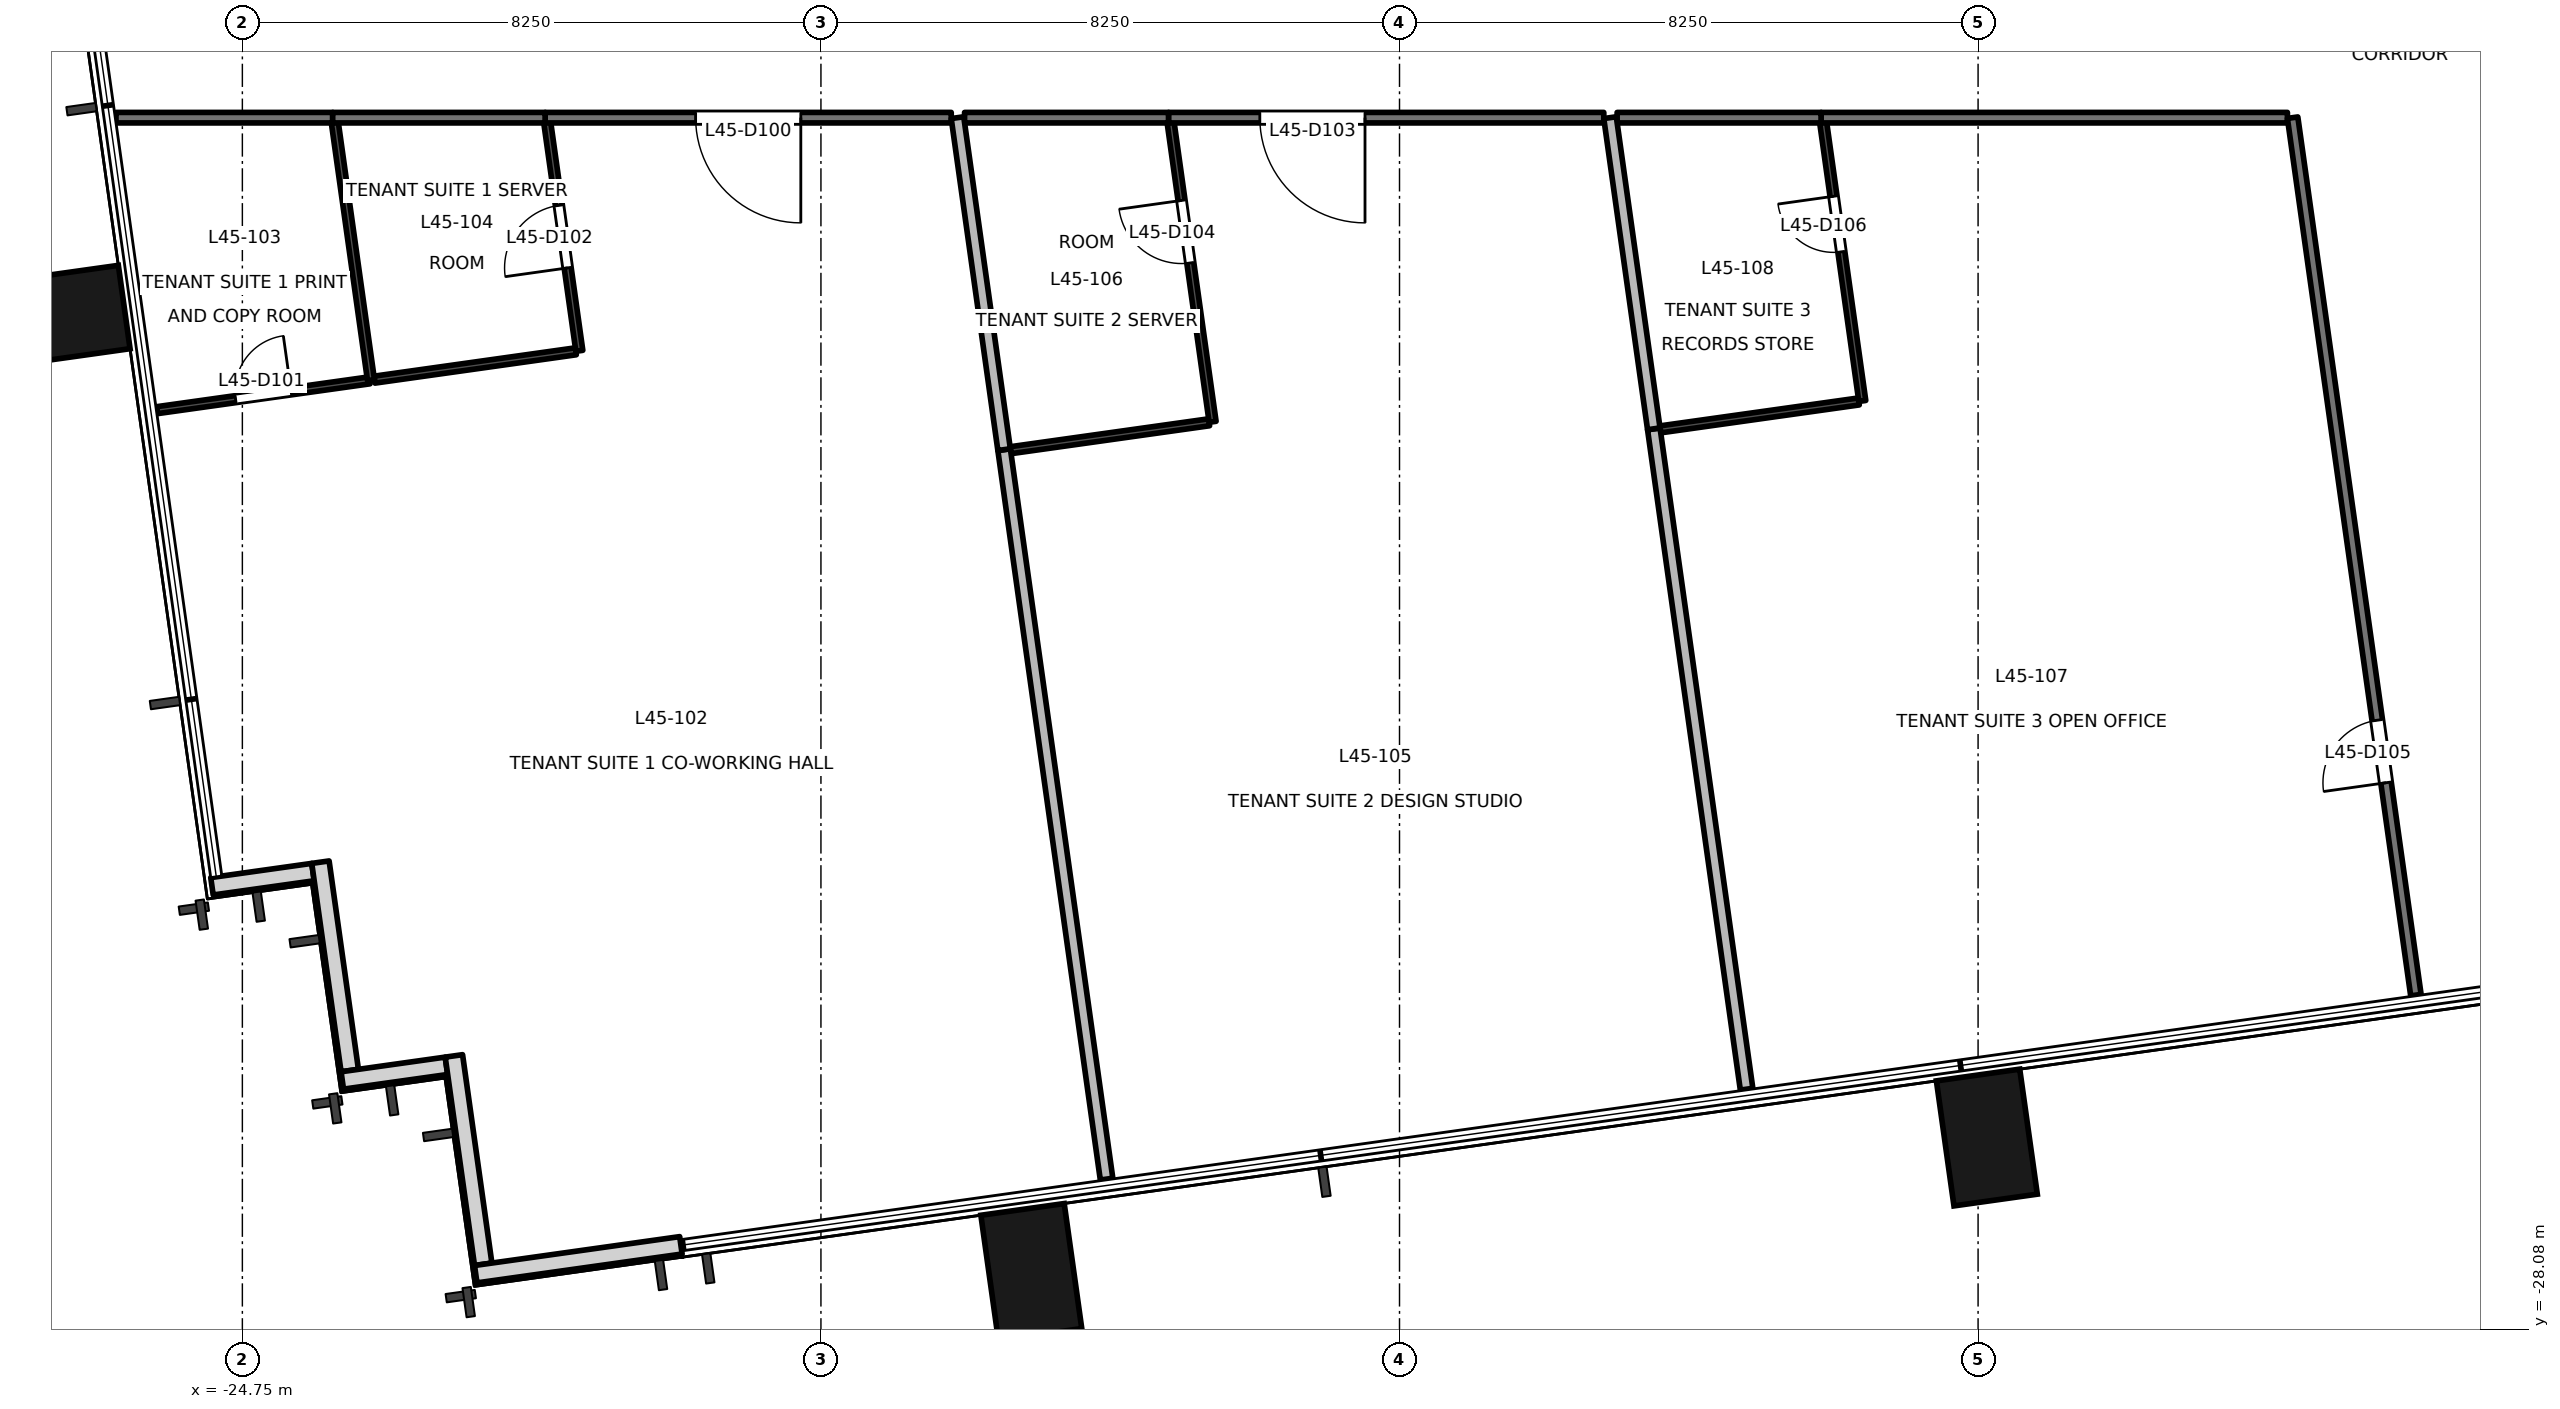
"""IFC4 building model, lengths in metres.
Left out: names, types, materials, properties, quantities, classifications, styles, units other than length and angle.
Written with IfcOpenShell. Run it as: python <this file> out.ifc"""

import sys

from ifc_helpers import new_model, si_unit, direction, frame, frame_2d, origin, origin_2d, place, context, subcontext, project, spatial, rectangle, extrude, element, fill, save


model = new_model("IFC4")
c1 = context("Model", 3, precision=1e-05, world=origin(), true_north=direction((0.0, 1.0)))
c2 = subcontext(c1, "Body", "Model", "MODEL_VIEW")
j1 = project(units=[si_unit("LENGTHUNIT", "METRE"), si_unit("PLANEANGLEUNIT", "RADIAN")], contexts=[c1])
p1 = place(None, origin())
s1 = spatial("IfcSite", under=j1, at=p1, CompositionType="ELEMENT")
p2 = place(p1, origin())
s2 = spatial("IfcBuilding", under=s1, at=p2, CompositionType="ELEMENT")
p3 = place(p2, frame((0.0, 0.0, 195.8)))
s3 = spatial("IfcBuildingStorey", under=s2, at=p3, CompositionType="ELEMENT", Elevation=195.8)
for number, where, z_axis, x_axis in (
    (1, (-13.5, -27.256, -0.2), (0.0, 0.0, 1.0), (0.99, 0.139, 0.0)),
    (2, (0.125, -25.34, -0.2), (0.0, 0.0, 1.0), (0.99, 0.139, 0.0)),
    (3, (-27.326, -13.625, -0.2), (0.0, 0.0, 1.0), (-0.139, 0.99, 0.0)),
):
    element("IfcColumn", number, at=place(p3, frame(where, z_axis=z_axis, x_axis=x_axis)), inside=s3, PredefinedType="COLUMN", context=c2, shape_type="SweptSolid", body=[
        extrude(rectangle(XDim=1.2, YDim=1.8, at=origin_2d()), origin(), (0.0, 0.0, 1.0), 3.9),
    ])
p4 = place(p3, frame((-25.184, -21.758, 0.0), z_axis=(0.0, 0.0, 1.0), x_axis=(0.9902493448, 0.13930626376, 0.0)))
e4 = element("IfcWall", 4, at=p4, inside=s3, PredefinedType="SOLIDWALL", context=c2, shape_type="SweptSolid", body=[
    extrude(rectangle(XDim=1.455, YDim=0.25, at=frame_2d((0.727, 0.0))), origin(), (0.0, 0.0, 1.0), 3.7),
])
p5 = place(p3, frame((-23.637, -21.414, 0.0), z_axis=(0.0, 0.0, 1.0), x_axis=(0.139313431826, -0.990248336385, 0.0)))
e5 = element("IfcWall", 5, at=p5, inside=s3, PredefinedType="SOLIDWALL", context=c2, shape_type="SweptSolid", body=[
    extrude(rectangle(XDim=3.0, YDim=0.25, at=frame_2d((1.5, 0.0))), origin(), (0.0, 0.0, 1.0), 3.7),
])
p6 = place(p3, frame((-23.325, -24.526, 0.0), z_axis=(0.0, 0.0, 1.0), x_axis=(0.990243596651, 0.13934711799, 0.0)))
e6 = element("IfcWall", 6, at=p6, inside=s3, PredefinedType="SOLIDWALL", context=c2, shape_type="SweptSolid", body=[
    extrude(rectangle(XDim=1.5, YDim=0.25, at=frame_2d((0.75, 0.0))), origin(), (0.0, 0.0, 1.0), 3.7),
])
p7 = place(p3, frame((-21.734, -24.176, 0.0), z_axis=(0.0, 0.0, 1.0), x_axis=(0.139313431826, -0.990248336385, 0.0)))
e7 = element("IfcWall", 7, at=p7, inside=s3, PredefinedType="SOLIDWALL", context=c2, shape_type="SweptSolid", body=[
    extrude(rectangle(XDim=3.0, YDim=0.25, at=frame_2d((1.5, 0.0))), origin(), (0.0, 0.0, 1.0), 3.7),
])
p8 = place(p3, frame((-21.422, -27.288, 0.0), z_axis=(0.0, 0.0, 1.0), x_axis=(0.990246427036, 0.139327002919, 0.0)))
e8 = element("IfcWall", 8, at=p8, inside=s3, PredefinedType="SOLIDWALL", context=c2, shape_type="SweptSolid", body=[
    extrude(rectangle(XDim=2.954, YDim=0.25, at=frame_2d((1.477, 0.0))), origin(), (0.0, 0.0, 1.0), 3.7),
])
p9 = place(p3, frame((-14.642, -10.8, 0.0), z_axis=(0.0, 0.0, 1.0), x_axis=(-1.0, 0.0, 0.0)))
e9 = element("IfcWall", 9, at=p9, inside=s3, PredefinedType="PARTITIONING", context=c2, shape_type="SweptSolid", body=[
    extrude(rectangle(XDim=5.791, YDim=0.15, at=frame_2d((2.896, 0.0))), origin(), (0.0, 0.0, 1.0), 3.7),
])
p10 = place(p9, frame((2.145, 0.0, 0.0)))
e10 = element("IfcOpeningElement", 10, at=p10, cuts=e9, PredefinedType="OPENING", context=c2, shape_type="SweptSolid", body=[
    extrude(rectangle(XDim=1.5, YDim=2.1, at=frame_2d((0.75, 1.05))), frame((0.0, 0.085, 0.0), z_axis=(0.0, -1.0, 0.0), x_axis=(1.0, 0.0, 0.0)), (0.0, 0.0, 1.0), 0.171),
])
p11 = place(p3, frame((-23.462, -10.8, 0.0), z_axis=(0.0, 0.0, 1.0), x_axis=(-1.0, 0.0, 0.0)))
e11 = element("IfcWall", 11, at=p11, inside=s3, PredefinedType="PARTITIONING", context=c2, shape_type="SweptSolid", body=[
    extrude(rectangle(XDim=3.09, YDim=0.15, at=frame_2d((1.545, 0.0))), origin(), (0.0, 0.0, 1.0), 3.7),
])
p12 = place(p3, frame((-20.433, -10.8, 0.0), z_axis=(0.0, 0.0, 1.0), x_axis=(-1.0, 0.0, 0.0)))
e12 = element("IfcWall", 12, at=p12, inside=s3, PredefinedType="PARTITIONING", context=c2, shape_type="SweptSolid", body=[
    extrude(rectangle(XDim=3.029, YDim=0.15, at=frame_2d((1.514, 0.0))), origin(), (0.0, 0.0, 1.0), 3.7),
])
p13 = place(p3, frame((-5.337, -10.8, 0.0), z_axis=(0.0, 0.0, 1.0), x_axis=(-1.0, 0.0, 0.0)))
e13 = element("IfcWall", 13, at=p13, inside=s3, PredefinedType="PARTITIONING", context=c2, shape_type="SweptSolid", body=[
    extrude(rectangle(XDim=6.207, YDim=0.15, at=frame_2d((3.104, 0.0))), origin(), (0.0, 0.0, 1.0), 2.8),
])
p14 = place(p13, frame((3.405, 0.0, 0.0)))
e14 = element("IfcOpeningElement", 14, at=p14, cuts=e13, PredefinedType="OPENING", context=c2, shape_type="SweptSolid", body=[
    extrude(rectangle(XDim=1.5, YDim=2.1, at=frame_2d((0.75, 1.05))), frame((0.0, 0.085, 0.0), z_axis=(0.0, -1.0, 0.0), x_axis=(1.0, 0.0, 0.0)), (0.0, 0.0, 1.0), 0.171),
])
p15 = place(p3, frame((-11.544, -10.8, 0.0), z_axis=(0.0, 0.0, 1.0), x_axis=(-1.0, 0.0, 0.0)))
e15 = element("IfcWall", 15, at=p15, inside=s3, PredefinedType="PARTITIONING", context=c2, shape_type="SweptSolid", body=[
    extrude(rectangle(XDim=2.908, YDim=0.15, at=frame_2d((1.454, 0.0))), origin(), (0.0, 0.0, 1.0), 2.8),
])
p16 = place(p3, frame((4.411, -10.8, 0.0), z_axis=(0.0, 0.0, 1.0), x_axis=(-1.0, 0.0, 0.0)))
e16 = element("IfcWall", 16, at=p16, inside=s3, PredefinedType="PARTITIONING", context=c2, shape_type="SweptSolid", body=[
    extrude(rectangle(XDim=6.65, YDim=0.15, at=frame_2d((3.325, 0.0))), origin(), (0.0, 0.0, 1.0), 2.9),
])
p17 = place(p3, frame((6.243, -23.31, 0.0), z_axis=(0.0, 0.0, 1.0), x_axis=(-0.139145566137, 0.990271938118, 0.0)))
e17 = element("IfcWall", 17, at=p17, inside=s3, PredefinedType="PARTITIONING", context=c2, shape_type="SweptSolid", body=[
    extrude(rectangle(XDim=12.633, YDim=0.15, at=frame_2d((6.316, 0.0))), origin(), (0.0, 0.0, 1.0), 2.9),
])
p18 = place(p17, frame((3.058, 0.0, 0.0)))
e18 = element("IfcOpeningElement", 18, at=p18, cuts=e17, PredefinedType="OPENING", context=c2, shape_type="SweptSolid", body=[
    extrude(rectangle(XDim=0.9, YDim=2.1, at=frame_2d((0.45, 1.05))), frame((0.0, 0.085, 0.0), z_axis=(0.0, -1.0, 0.0), x_axis=(1.0, 0.0, 0.0)), (0.0, 0.0, 1.0), 0.171),
])
p19 = place(p3, frame((-2.239, -10.8, 0.0), z_axis=(0.0, 0.0, 1.0), x_axis=(-1.0, 0.0, 0.0)))
e19 = element("IfcWall", 19, at=p19, inside=s3, PredefinedType="PARTITIONING", context=c2, shape_type="SweptSolid", body=[
    extrude(rectangle(XDim=2.908, YDim=0.15, at=frame_2d((1.454, 0.0))), origin(), (0.0, 0.0, 1.0), 2.9),
])
p20 = place(p3, frame((-25.966, -14.97, 0.0), z_axis=(0.0, 0.0, 1.0), x_axis=(0.990303801212, 0.138918613964, 0.0)))
e20 = element("IfcWall", 20, at=p20, inside=s3, PredefinedType="PARTITIONING", context=c2, shape_type="SweptSolid", body=[
    extrude(rectangle(XDim=3.06, YDim=0.1, at=frame_2d((1.53, 0.0))), origin(), (0.0, 0.0, 1.0), 3.7),
])
p21 = place(p20, frame((1.13, 0.0, 0.0)))
e21 = element("IfcOpeningElement", 21, at=p21, cuts=e20, PredefinedType="OPENING", context=c2, shape_type="SweptSolid", body=[
    extrude(rectangle(XDim=0.8, YDim=2.1, at=frame_2d((0.4, 1.05))), frame((0.0, 0.061, 0.0), z_axis=(0.0, -1.0, 0.0), x_axis=(1.0, 0.0, 0.0)), (0.0, 0.0, 1.0), 0.121),
])
p22 = place(p3, frame((-22.866, -14.535, 0.0), z_axis=(0.0, 0.0, 1.0), x_axis=(0.9902520421, 0.139287088837, 0.0)))
e22 = element("IfcWall", 22, at=p22, inside=s3, PredefinedType="PARTITIONING", context=c2, shape_type="SweptSolid", body=[
    extrude(rectangle(XDim=2.899, YDim=0.1, at=frame_2d((1.45, 0.0))), origin(), (0.0, 0.0, 1.0), 3.7),
])
p23 = place(p3, frame((-19.945, -14.124, 0.0), z_axis=(0.0, 0.0, 1.0), x_axis=(-0.139290097993, 0.990251618833, 0.0)))
e23 = element("IfcWall", 23, at=p23, inside=s3, PredefinedType="PARTITIONING", context=c2, shape_type="SweptSolid", body=[
    extrude(rectangle(XDim=3.288, YDim=0.1, at=frame_2d((1.644, 0.0))), origin(), (0.0, 0.0, 1.0), 3.7),
])
p24 = place(p23, frame((1.194, 0.0, 0.0)))
e24 = element("IfcOpeningElement", 24, at=p24, cuts=e23, PredefinedType="OPENING", context=c2, shape_type="SweptSolid", body=[
    extrude(rectangle(XDim=0.9, YDim=2.1, at=frame_2d((0.45, 1.05))), frame((0.0, 0.061, 0.0), z_axis=(0.0, -1.0, 0.0), x_axis=(1.0, 0.0, 0.0)), (0.0, 0.0, 1.0), 0.121),
])
p25 = place(p3, frame((-13.888, -15.533, 0.0), z_axis=(0.0, 0.0, 1.0), x_axis=(0.139107013986, -0.990277354411, 0.0)))
e25 = element("IfcWall", 25, at=p25, inside=s3, PredefinedType="PARTITIONING", context=c2, shape_type="SweptSolid", body=[
    extrude(rectangle(XDim=10.502, YDim=0.18, at=frame_2d((5.251, 0.0))), origin(), (0.0, 0.0, 1.0), 2.8),
])
p26 = place(p3, frame((-14.553, -10.8, 0.0), z_axis=(0.0, 0.0, 1.0), x_axis=(0.139146821365, -0.990271761742, 0.0)))
e26 = element("IfcWall", 26, at=p26, inside=s3, PredefinedType="PARTITIONING", context=c2, shape_type="SweptSolid", body=[
    extrude(rectangle(XDim=4.779, YDim=0.18, at=frame_2d((2.39, 0.0))), origin(), (0.0, 0.0, 1.0), 3.7),
])
p27 = place(p3, frame((-23.432, -10.868, 0.0), z_axis=(0.0, 0.0, 1.0), x_axis=(0.139044103827, -0.990286189539, 0.0)))
e27 = element("IfcWall", 27, at=p27, inside=s3, PredefinedType="PARTITIONING", context=c2, shape_type="SweptSolid", body=[
    extrude(rectangle(XDim=3.71, YDim=0.1, at=frame_2d((1.855, 0.0))), origin(), (0.0, 0.0, 1.0), 3.7),
])
p28 = place(p3, frame((-13.796, -15.541, 0.0), z_axis=(0.0, 0.0, 1.0), x_axis=(0.990263018372, 0.139209031475, 0.0)))
e28 = element("IfcWall", 28, at=p28, inside=s3, PredefinedType="PARTITIONING", context=c2, shape_type="SweptSolid", body=[
    extrude(rectangle(XDim=2.859, YDim=0.1, at=frame_2d((1.429, 0.0))), origin(), (0.0, 0.0, 1.0), 2.8),
])
p29 = place(p3, frame((-10.915, -15.136, 0.0), z_axis=(0.0, 0.0, 1.0), x_axis=(-0.138954517122, 0.990298764097, 0.0)))
e29 = element("IfcWall", 29, at=p29, inside=s3, PredefinedType="PARTITIONING", context=c2, shape_type="SweptSolid", body=[
    extrude(rectangle(XDim=4.31, YDim=0.1, at=frame_2d((2.155, 0.0))), origin(), (0.0, 0.0, 1.0), 3.7),
])
p30 = place(p29, frame((2.287, 0.0, 0.0)))
e30 = element("IfcOpeningElement", 30, at=p30, cuts=e29, PredefinedType="OPENING", context=c2, shape_type="SweptSolid", body=[
    extrude(rectangle(XDim=0.9, YDim=2.1, at=frame_2d((0.45, 1.05))), frame((0.0, 0.061, 0.0), z_axis=(0.0, -1.0, 0.0), x_axis=(1.0, 0.0, 0.0)), (0.0, 0.0, 1.0), 0.121),
])
p31 = place(p3, frame((-4.624, -15.237, 0.0), z_axis=(0.0, 0.0, 1.0), x_axis=(0.13917022879, -0.990268472395, 0.0)))
e31 = element("IfcWall", 31, at=p31, inside=s3, PredefinedType="PARTITIONING", context=c2, shape_type="SweptSolid", body=[
    extrude(rectangle(XDim=9.506, YDim=0.18, at=frame_2d((4.753, 0.0))), origin(), (0.0, 0.0, 1.0), 2.9),
])
p32 = place(p3, frame((-5.248, -10.8, 0.0), z_axis=(0.0, 0.0, 1.0), x_axis=(0.139299923233, -0.990250236752, 0.0)))
e32 = element("IfcWall", 32, at=p32, inside=s3, PredefinedType="PARTITIONING", context=c2, shape_type="SweptSolid", body=[
    extrude(rectangle(XDim=4.48, YDim=0.18, at=frame_2d((2.24, 0.0))), origin(), (0.0, 0.0, 1.0), 2.9),
])
p33 = place(p3, frame((-4.532, -15.244, 0.0), z_axis=(0.0, 0.0, 1.0), x_axis=(0.990264673226, 0.139197259172, 0.0)))
e33 = element("IfcWall", 33, at=p33, inside=s3, PredefinedType="PARTITIONING", context=c2, shape_type="SweptSolid", body=[
    extrude(rectangle(XDim=2.859, YDim=0.1, at=frame_2d((1.429, 0.0))), origin(), (0.0, 0.0, 1.0), 2.9),
])
p34 = place(p3, frame((-1.651, -14.839, 0.0), z_axis=(0.0, 0.0, 1.0), x_axis=(-0.139170879072, 0.990268381005, 0.0)))
e34 = element("IfcWall", 34, at=p34, inside=s3, PredefinedType="PARTITIONING", context=c2, shape_type="SweptSolid", body=[
    extrude(rectangle(XDim=4.01, YDim=0.1, at=frame_2d((2.005, 0.0))), origin(), (0.0, 0.0, 1.0), 3.7),
])
p35 = place(p34, frame((2.147, 0.0, 0.0)))
e35 = element("IfcOpeningElement", 35, at=p35, cuts=e34, PredefinedType="OPENING", context=c2, shape_type="SweptSolid", body=[
    extrude(rectangle(XDim=0.8, YDim=2.1, at=frame_2d((0.4, 1.05))), frame((0.0, 0.061, 0.0), z_axis=(0.0, -1.0, 0.0), x_axis=(1.0, 0.0, 0.0)), (0.0, 0.0, 1.0), 0.121),
])
p36 = place(p10, origin())
e36 = element("IfcDoor", 36, at=p36, inside=s3, OperationType="DOUBLE_DOOR_SINGLE_SWING", PredefinedType="DOOR", context=c2, shape_type="SweptSolid", body=[
    extrude(rectangle(XDim=1.5, YDim=2.1, at=frame_2d((0.75, 1.05))), frame((0.0, 0.025, 0.0), z_axis=(0.0, -1.0, 0.0), x_axis=(1.0, 0.0, 0.0)), (0.0, 0.0, 1.0), 0.05),
])
fill(e10, e36)
p37 = place(p21, origin())
e37 = element("IfcDoor", 37, at=p37, inside=s3, OperationType="SINGLE_SWING_RIGHT", PredefinedType="DOOR", context=c2, shape_type="SweptSolid", body=[
    extrude(rectangle(XDim=0.8, YDim=2.1, at=frame_2d((0.4, 1.05))), frame((0.0, 0.025, 0.0), z_axis=(0.0, -1.0, 0.0), x_axis=(1.0, 0.0, 0.0)), (0.0, 0.0, 1.0), 0.05),
])
fill(e21, e37)
p38 = place(p24, origin())
e38 = element("IfcDoor", 38, at=p38, inside=s3, OperationType="SINGLE_SWING_LEFT", PredefinedType="DOOR", context=c2, shape_type="SweptSolid", body=[
    extrude(rectangle(XDim=0.9, YDim=2.1, at=frame_2d((0.45, 1.05))), frame((0.0, 0.025, 0.0), z_axis=(0.0, -1.0, 0.0), x_axis=(1.0, 0.0, 0.0)), (0.0, 0.0, 1.0), 0.05),
])
fill(e24, e38)
p39 = place(p14, origin())
e39 = element("IfcDoor", 39, at=p39, inside=s3, OperationType="DOUBLE_DOOR_SINGLE_SWING", PredefinedType="DOOR", context=c2, shape_type="SweptSolid", body=[
    extrude(rectangle(XDim=1.5, YDim=2.1, at=frame_2d((0.75, 1.05))), frame((0.0, 0.025, 0.0), z_axis=(0.0, -1.0, 0.0), x_axis=(1.0, 0.0, 0.0)), (0.0, 0.0, 1.0), 0.05),
])
fill(e14, e39)
p40 = place(p30, origin())
e40 = element("IfcDoor", 40, at=p40, inside=s3, OperationType="SINGLE_SWING_RIGHT", PredefinedType="DOOR", context=c2, shape_type="SweptSolid", body=[
    extrude(rectangle(XDim=0.9, YDim=2.1, at=frame_2d((0.45, 1.05))), frame((0.0, 0.025, 0.0), z_axis=(0.0, -1.0, 0.0), x_axis=(1.0, 0.0, 0.0)), (0.0, 0.0, 1.0), 0.05),
])
fill(e30, e40)
p41 = place(p18, origin())
e41 = element("IfcDoor", 41, at=p41, inside=s3, OperationType="SINGLE_SWING_LEFT", PredefinedType="DOOR", context=c2, shape_type="SweptSolid", body=[
    extrude(rectangle(XDim=0.9, YDim=2.1, at=frame_2d((0.45, 1.05))), frame((0.0, 0.025, 0.0), z_axis=(0.0, -1.0, 0.0), x_axis=(1.0, 0.0, 0.0)), (0.0, 0.0, 1.0), 0.05),
])
fill(e18, e41)
p42 = place(p35, origin())
e42 = element("IfcDoor", 42, at=p42, inside=s3, OperationType="SINGLE_SWING_RIGHT", PredefinedType="DOOR", context=c2, shape_type="SweptSolid", body=[
    extrude(rectangle(XDim=0.8, YDim=2.1, at=frame_2d((0.4, 1.05))), frame((0.0, 0.025, 0.0), z_axis=(0.0, -1.0, 0.0), x_axis=(1.0, 0.0, 0.0)), (0.0, 0.0, 1.0), 0.05),
])
fill(e35, e42)
save(model, sys.argv[1])
